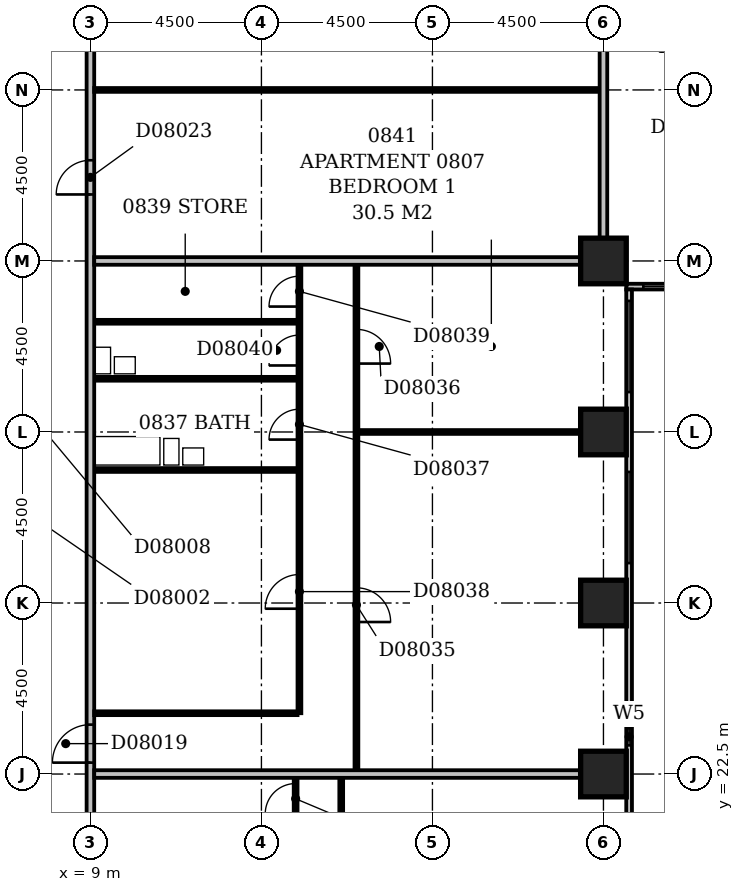
"""IFC4 building model, lengths in metres.
Left out: names, types, materials, properties, quantities, classifications, styles, units other than length and angle.
Written with IfcOpenShell. Run it as: python <this file> out.ifc"""

import sys

from ifc_helpers import new_model, si_unit, direction, frame, frame_2d, origin, origin_2d, place, context, subcontext, project, spatial, rectangle, extrude, element, fill, save


model = new_model("IFC4")
c1 = context("Model", 3, precision=1e-05, world=origin(), true_north=direction((0.0, 1.0)))
c2 = subcontext(c1, "Body", "Model", "MODEL_VIEW")
j1 = project(units=[si_unit("LENGTHUNIT", "METRE"), si_unit("PLANEANGLEUNIT", "RADIAN")], contexts=[c1])
p1 = place(None, origin())
s1 = spatial("IfcSite", under=j1, at=p1, CompositionType="ELEMENT")
p2 = place(p1, origin())
s2 = spatial("IfcBuilding", under=s1, at=p2, CompositionType="ELEMENT")
p3 = place(p2, frame((0.0, 0.0, 39.8)))
s3 = spatial("IfcBuildingStorey", under=s2, at=p3, CompositionType="ELEMENT", Elevation=39.8)
for number, where, z_axis, x_axis in (
    (1, (22.5, 22.5, -0.3), (0.0, 0.0, 1.0), (1.0, 0.0, 0.0)),
    (2, (22.5, 27.0, -0.3), (0.0, 0.0, 1.0), (1.0, 0.0, 0.0)),
    (3, (22.5, 31.5, -0.3), (0.0, 0.0, 1.0), (1.0, 0.0, 0.0)),
    (4, (22.5, 36.0, -0.3), (0.0, 0.0, 1.0), (1.0, 0.0, 0.0)),
):
    element("IfcColumn", number, at=place(p3, frame(where, z_axis=z_axis, x_axis=x_axis)), inside=s3, PredefinedType="COLUMN", context=c2, shape_type="SweptSolid", body=[
        extrude(rectangle(XDim=1.2, YDim=1.2, at=origin_2d()), origin(), (0.0, 0.0, 1.0), 3.6),
    ])
p4 = place(p3, frame((23.175, 17.4, 0.0), z_axis=(0.0, 0.0, 1.0), x_axis=(0.0, 1.0, 0.0)))
e5 = element("IfcWall", 5, at=p4, inside=s3, PredefinedType="STANDARD", context=c2, shape_type="SweptSolid", body=[
    extrude(rectangle(XDim=17.85, YDim=0.15, at=frame_2d((8.925, 0.0))), origin(), (0.0, 0.0, 1.0), 2.7),
])
p5 = place(p4, frame((1.65, 0.0, 0.6)))
e6 = element("IfcOpeningElement", 6, at=p5, cuts=e5, PredefinedType="OPENING", context=c2, shape_type="SweptSolid", body=[
    extrude(rectangle(XDim=2.4, YDim=1.8, at=frame_2d((1.2, 0.9))), frame((0.0, 0.087, 0.0), z_axis=(0.0, -1.0, 0.0), x_axis=(1.0, 0.0, 0.0)), (0.0, 0.0, 1.0), 0.174),
])
p6 = place(p4, frame((5.854, 0.0, 0.6)))
e7 = element("IfcOpeningElement", 7, at=p6, cuts=e5, PredefinedType="OPENING", context=c2, shape_type="SweptSolid", body=[
    extrude(rectangle(XDim=0.45, YDim=1.8, at=frame_2d((0.225, 0.9))), frame((0.0, 0.087, 0.0), z_axis=(0.0, -1.0, 0.0), x_axis=(1.0, 0.0, 0.0)), (0.0, 0.0, 1.0), 0.174),
])
p7 = place(p4, frame((10.65, 0.0, 0.6)))
e8 = element("IfcOpeningElement", 8, at=p7, cuts=e5, PredefinedType="OPENING", context=c2, shape_type="SweptSolid", body=[
    extrude(rectangle(XDim=2.4, YDim=1.8, at=frame_2d((1.2, 0.9))), frame((0.0, 0.087, 0.0), z_axis=(0.0, -1.0, 0.0), x_axis=(1.0, 0.0, 0.0)), (0.0, 0.0, 1.0), 0.174),
])
p8 = place(p4, frame((15.15, 0.0, 0.6)))
e9 = element("IfcOpeningElement", 9, at=p8, cuts=e5, PredefinedType="OPENING", context=c2, shape_type="SweptSolid", body=[
    extrude(rectangle(XDim=2.4, YDim=1.8, at=frame_2d((1.2, 0.9))), frame((0.0, 0.087, 0.0), z_axis=(0.0, -1.0, 0.0), x_axis=(1.0, 0.0, 0.0)), (0.0, 0.0, 1.0), 0.174),
])
p9 = place(p3, frame((23.1, 35.325, 0.0), z_axis=(0.0, 0.0, 1.0), x_axis=(1.0, 0.0, 0.0)))
e10 = element("IfcWall", 10, at=p9, inside=s3, PredefinedType="STANDARD", context=c2, shape_type="SweptSolid", body=[
    extrude(rectangle(XDim=45.15, YDim=0.15, at=frame_2d((22.575, 0.0))), origin(), (0.0, 0.0, 1.0), 2.7),
])
p10 = place(p9, frame((0.45, 0.0, 0.6)))
e11 = element("IfcOpeningElement", 11, at=p10, cuts=e10, PredefinedType="OPENING", context=c2, shape_type="SweptSolid", body=[
    extrude(rectangle(XDim=2.4, YDim=1.8, at=frame_2d((1.2, 0.9))), frame((0.0, 0.087, 0.0), z_axis=(0.0, -1.0, 0.0), x_axis=(1.0, 0.0, 0.0)), (0.0, 0.0, 1.0), 0.174),
])
p11 = place(p9, frame((6.56, 0.0, 0.6)))
e12 = element("IfcOpeningElement", 12, at=p11, cuts=e10, PredefinedType="OPENING", context=c2, shape_type="SweptSolid", body=[
    extrude(rectangle(XDim=0.9, YDim=1.8, at=frame_2d((0.45, 0.9))), frame((0.0, 0.087, 0.0), z_axis=(0.0, -1.0, 0.0), x_axis=(1.0, 0.0, 0.0)), (0.0, 0.0, 1.0), 0.174),
])
p12 = place(p9, frame((9.45, 0.0, 0.6)))
e13 = element("IfcOpeningElement", 13, at=p12, cuts=e10, PredefinedType="OPENING", context=c2, shape_type="SweptSolid", body=[
    extrude(rectangle(XDim=2.4, YDim=1.8, at=frame_2d((1.2, 0.9))), frame((0.0, 0.087, 0.0), z_axis=(0.0, -1.0, 0.0), x_axis=(1.0, 0.0, 0.0)), (0.0, 0.0, 1.0), 0.174),
])
p13 = place(p9, frame((13.95, 0.0, 0.6)))
e14 = element("IfcOpeningElement", 14, at=p13, cuts=e10, PredefinedType="OPENING", context=c2, shape_type="SweptSolid", body=[
    extrude(rectangle(XDim=2.4, YDim=1.8, at=frame_2d((1.2, 0.9))), frame((0.0, 0.087, 0.0), z_axis=(0.0, -1.0, 0.0), x_axis=(1.0, 0.0, 0.0)), (0.0, 0.0, 1.0), 0.174),
])
p14 = place(p9, frame((18.33, 0.0, 0.6)))
e15 = element("IfcOpeningElement", 15, at=p14, cuts=e10, PredefinedType="OPENING", context=c2, shape_type="SweptSolid", body=[
    extrude(rectangle(XDim=1.5, YDim=1.8, at=frame_2d((0.75, 0.9))), frame((0.0, 0.087, 0.0), z_axis=(0.0, -1.0, 0.0), x_axis=(1.0, 0.0, 0.0)), (0.0, 0.0, 1.0), 0.174),
])
p15 = place(p9, frame((22.95, 0.0, 0.6)))
e16 = element("IfcOpeningElement", 16, at=p15, cuts=e10, PredefinedType="OPENING", context=c2, shape_type="SweptSolid", body=[
    extrude(rectangle(XDim=2.4, YDim=1.8, at=frame_2d((1.2, 0.9))), frame((0.0, 0.087, 0.0), z_axis=(0.0, -1.0, 0.0), x_axis=(1.0, 0.0, 0.0)), (0.0, 0.0, 1.0), 0.174),
])
p16 = place(p9, frame((27.45, 0.0, 0.6)))
e17 = element("IfcOpeningElement", 17, at=p16, cuts=e10, PredefinedType="OPENING", context=c2, shape_type="SweptSolid", body=[
    extrude(rectangle(XDim=2.4, YDim=1.8, at=frame_2d((1.2, 0.9))), frame((0.0, 0.087, 0.0), z_axis=(0.0, -1.0, 0.0), x_axis=(1.0, 0.0, 0.0)), (0.0, 0.0, 1.0), 0.174),
])
p17 = place(p9, frame((31.797, 0.0, 0.6)))
e18 = element("IfcOpeningElement", 18, at=p17, cuts=e10, PredefinedType="OPENING", context=c2, shape_type="SweptSolid", body=[
    extrude(rectangle(XDim=0.6, YDim=1.8, at=frame_2d((0.3, 0.9))), frame((0.0, 0.087, 0.0), z_axis=(0.0, -1.0, 0.0), x_axis=(1.0, 0.0, 0.0)), (0.0, 0.0, 1.0), 0.174),
])
p18 = place(p9, frame((36.45, 0.0, 0.6)))
e19 = element("IfcOpeningElement", 19, at=p18, cuts=e10, PredefinedType="OPENING", context=c2, shape_type="SweptSolid", body=[
    extrude(rectangle(XDim=2.4, YDim=1.8, at=frame_2d((1.2, 0.9))), frame((0.0, 0.087, 0.0), z_axis=(0.0, -1.0, 0.0), x_axis=(1.0, 0.0, 0.0)), (0.0, 0.0, 1.0), 0.174),
])
p19 = place(p9, frame((40.95, 0.0, 0.6)))
e20 = element("IfcOpeningElement", 20, at=p19, cuts=e10, PredefinedType="OPENING", context=c2, shape_type="SweptSolid", body=[
    extrude(rectangle(XDim=2.4, YDim=1.8, at=frame_2d((1.2, 0.9))), frame((0.0, 0.087, 0.0), z_axis=(0.0, -1.0, 0.0), x_axis=(1.0, 0.0, 0.0)), (0.0, 0.0, 1.0), 0.174),
])
p20 = place(p3, frame((9.0, 5.0, 0.0), z_axis=(0.0, 0.0, 1.0), x_axis=(0.0, 1.0, 0.0)))
e21 = element("IfcWall", 21, at=p20, inside=s3, PredefinedType="PARTITIONING", context=c2, shape_type="SweptSolid", body=[
    extrude(rectangle(XDim=44.5, YDim=0.2, at=frame_2d((22.25, 0.0))), origin(), (0.0, 0.0, 1.0), 3.3),
])
p21 = place(p20, frame((17.8, 0.0, 0.0)))
e22 = element("IfcOpeningElement", 22, at=p21, cuts=e21, PredefinedType="OPENING", context=c2, shape_type="SweptSolid", body=[
    extrude(rectangle(XDim=1.0, YDim=2.1, at=frame_2d((0.5, 1.05))), frame((0.0, 0.112, 0.0), z_axis=(0.0, -1.0, 0.0), x_axis=(1.0, 0.0, 0.0)), (0.0, 0.0, 1.0), 0.224),
])
p22 = place(p20, frame((14.95, 0.0, 0.0)))
e23 = element("IfcOpeningElement", 23, at=p22, cuts=e21, PredefinedType="OPENING", context=c2, shape_type="SweptSolid", body=[
    extrude(rectangle(XDim=1.0, YDim=2.1, at=frame_2d((0.5, 1.05))), frame((0.0, 0.112, 0.0), z_axis=(0.0, -1.0, 0.0), x_axis=(1.0, 0.0, 0.0)), (0.0, 0.0, 1.0), 0.224),
])
p23 = place(p20, frame((10.45, 0.0, 0.0)))
e24 = element("IfcOpeningElement", 24, at=p23, cuts=e21, PredefinedType="OPENING", context=c2, shape_type="SweptSolid", body=[
    extrude(rectangle(XDim=1.0, YDim=2.1, at=frame_2d((0.5, 1.05))), frame((0.0, 0.112, 0.0), z_axis=(0.0, -1.0, 0.0), x_axis=(1.0, 0.0, 0.0)), (0.0, 0.0, 1.0), 0.224),
])
p24 = place(p20, frame((5.95, 0.0, 0.0)))
e25 = element("IfcOpeningElement", 25, at=p24, cuts=e21, PredefinedType="OPENING", context=c2, shape_type="SweptSolid", body=[
    extrude(rectangle(XDim=1.0, YDim=2.1, at=frame_2d((0.5, 1.05))), frame((0.0, 0.112, 0.0), z_axis=(0.0, -1.0, 0.0), x_axis=(1.0, 0.0, 0.0)), (0.0, 0.0, 1.0), 0.224),
])
p25 = place(p20, frame((32.75, 0.0, 0.0)))
e26 = element("IfcOpeningElement", 26, at=p25, cuts=e21, PredefinedType="OPENING", context=c2, shape_type="SweptSolid", body=[
    extrude(rectangle(XDim=0.9, YDim=2.1, at=frame_2d((0.45, 1.05))), frame((0.0, 0.112, 0.0), z_axis=(0.0, -1.0, 0.0), x_axis=(1.0, 0.0, 0.0)), (0.0, 0.0, 1.0), 0.224),
])
p26 = place(p20, frame((1.5, 0.0, 0.0)))
e27 = element("IfcOpeningElement", 27, at=p26, cuts=e21, PredefinedType="OPENING", context=c2, shape_type="SweptSolid", body=[
    extrude(rectangle(XDim=0.9, YDim=2.1, at=frame_2d((0.45, 1.05))), frame((0.0, 0.112, 0.0), z_axis=(0.0, -1.0, 0.0), x_axis=(1.0, 0.0, 0.0)), (0.0, 0.0, 1.0), 0.224),
])
p27 = place(p3, frame((15.6, 18.1, 0.0), z_axis=(0.0, 0.0, 1.0), x_axis=(0.0, 1.0, 0.0)))
e28 = element("IfcWall", 28, at=p27, inside=s3, PredefinedType="PARTITIONING", context=c2, shape_type="SweptSolid", body=[
    extrude(rectangle(XDim=4.3, YDim=0.1, at=frame_2d((2.15, 0.0))), origin(), (0.0, 0.0, 1.0), 3.3),
])
p28 = place(p27, frame((1.7, 0.0, 0.0)))
e29 = element("IfcOpeningElement", 29, at=p28, cuts=e28, PredefinedType="OPENING", context=c2, shape_type="SweptSolid", body=[
    extrude(rectangle(XDim=0.9, YDim=2.1, at=frame_2d((0.45, 1.05))), frame((0.0, 0.062, 0.0), z_axis=(0.0, -1.0, 0.0), x_axis=(1.0, 0.0, 0.0)), (0.0, 0.0, 1.0), 0.124),
])
p29 = place(p3, frame((14.4, 21.2, 0.0), z_axis=(0.0, 0.0, 1.0), x_axis=(0.0, 1.0, 0.0)))
e30 = element("IfcWall", 30, at=p29, inside=s3, PredefinedType="PARTITIONING", context=c2, shape_type="SweptSolid", body=[
    extrude(rectangle(XDim=1.2, YDim=0.1, at=frame_2d((0.6, 0.0))), origin(), (0.0, 0.0, 1.0), 3.3),
])
p30 = place(p29, frame((0.25, 0.0, 0.0)))
e31 = element("IfcOpeningElement", 31, at=p30, cuts=e30, PredefinedType="OPENING", context=c2, shape_type="SweptSolid", body=[
    extrude(rectangle(XDim=0.8, YDim=2.1, at=frame_2d((0.4, 1.05))), frame((0.0, 0.062, 0.0), z_axis=(0.0, -1.0, 0.0), x_axis=(1.0, 0.0, 0.0)), (0.0, 0.0, 1.0), 0.124),
])
p31 = place(p3, frame((9.1, 22.5, 0.0), z_axis=(0.0, 0.0, 1.0), x_axis=(1.0, 0.0, 0.0)))
e32 = element("IfcWall", 32, at=p31, inside=s3, PredefinedType="PARTITIONING", context=c2, shape_type="SweptSolid", body=[
    extrude(rectangle(XDim=12.8, YDim=0.2, at=frame_2d((6.4, 0.0))), origin(), (0.0, 0.0, 1.0), 3.3),
])
p32 = place(p3, frame((16.0, 22.6, 0.0), z_axis=(0.0, 0.0, 1.0), x_axis=(0.0, 1.0, 0.0)))
e33 = element("IfcWall", 33, at=p32, inside=s3, PredefinedType="PARTITIONING", context=c2, shape_type="SweptSolid", body=[
    extrude(rectangle(XDim=13.3, YDim=0.1, at=frame_2d((6.65, 0.0))), origin(), (0.0, 0.0, 1.0), 3.3),
])
p33 = place(p32, frame((3.9, 0.0, 0.0)))
e34 = element("IfcOpeningElement", 34, at=p33, cuts=e33, PredefinedType="OPENING", context=c2, shape_type="SweptSolid", body=[
    extrude(rectangle(XDim=0.9, YDim=2.1, at=frame_2d((0.45, 1.05))), frame((0.0, 0.062, 0.0), z_axis=(0.0, -1.0, 0.0), x_axis=(1.0, 0.0, 0.0)), (0.0, 0.0, 1.0), 0.124),
])
p34 = place(p32, frame((10.7, 0.0, 0.0)))
e35 = element("IfcOpeningElement", 35, at=p34, cuts=e33, PredefinedType="OPENING", context=c2, shape_type="SweptSolid", body=[
    extrude(rectangle(XDim=0.9, YDim=2.1, at=frame_2d((0.45, 1.05))), frame((0.0, 0.062, 0.0), z_axis=(0.0, -1.0, 0.0), x_axis=(1.0, 0.0, 0.0)), (0.0, 0.0, 1.0), 0.124),
])
p35 = place(p3, frame((9.1, 24.1, 0.0), z_axis=(0.0, 0.0, 1.0), x_axis=(1.0, 0.0, 0.0)))
e36 = element("IfcWall", 36, at=p35, inside=s3, PredefinedType="PARTITIONING", context=c2, shape_type="SweptSolid", body=[
    extrude(rectangle(XDim=5.35, YDim=0.1, at=frame_2d((2.675, 0.0))), origin(), (0.0, 0.0, 1.0), 3.3),
])
p36 = place(p3, frame((14.5, 24.1, 0.0), z_axis=(0.0, 0.0, 1.0), x_axis=(0.0, 1.0, 0.0)))
e37 = element("IfcWall", 37, at=p36, inside=s3, PredefinedType="PARTITIONING", context=c2, shape_type="SweptSolid", body=[
    extrude(rectangle(XDim=11.8, YDim=0.1, at=frame_2d((5.9, 0.0))), origin(), (0.0, 0.0, 1.0), 3.3),
])
p37 = place(p36, frame((7.2, 0.0, 0.0)))
e38 = element("IfcOpeningElement", 38, at=p37, cuts=e37, PredefinedType="OPENING", context=c2, shape_type="SweptSolid", body=[
    extrude(rectangle(XDim=0.8, YDim=2.1, at=frame_2d((0.4, 1.05))), frame((0.0, 0.062, 0.0), z_axis=(0.0, -1.0, 0.0), x_axis=(1.0, 0.0, 0.0)), (0.0, 0.0, 1.0), 0.124),
])
p38 = place(p36, frame((2.75, 0.0, 0.0)))
e39 = element("IfcOpeningElement", 39, at=p38, cuts=e37, PredefinedType="OPENING", context=c2, shape_type="SweptSolid", body=[
    extrude(rectangle(XDim=0.9, YDim=2.1, at=frame_2d((0.45, 1.05))), frame((0.0, 0.062, 0.0), z_axis=(0.0, -1.0, 0.0), x_axis=(1.0, 0.0, 0.0)), (0.0, 0.0, 1.0), 0.124),
])
p39 = place(p36, frame((10.7, 0.0, 0.0)))
e40 = element("IfcOpeningElement", 40, at=p39, cuts=e37, PredefinedType="OPENING", context=c2, shape_type="SweptSolid", body=[
    extrude(rectangle(XDim=0.8, YDim=2.1, at=frame_2d((0.4, 1.05))), frame((0.0, 0.062, 0.0), z_axis=(0.0, -1.0, 0.0), x_axis=(1.0, 0.0, 0.0)), (0.0, 0.0, 1.0), 0.124),
])
p40 = place(p36, frame((9.15, 0.0, 0.0)))
e41 = element("IfcOpeningElement", 41, at=p40, cuts=e37, PredefinedType="OPENING", context=c2, shape_type="SweptSolid", body=[
    extrude(rectangle(XDim=0.8, YDim=2.1, at=frame_2d((0.4, 1.05))), frame((0.0, 0.062, 0.0), z_axis=(0.0, -1.0, 0.0), x_axis=(1.0, 0.0, 0.0)), (0.0, 0.0, 1.0), 0.124),
])
p41 = place(p3, frame((9.1, 30.5, 0.0), z_axis=(0.0, 0.0, 1.0), x_axis=(1.0, 0.0, 0.0)))
e42 = element("IfcWall", 42, at=p41, inside=s3, PredefinedType="PLUMBINGWALL", context=c2, shape_type="SweptSolid", body=[
    extrude(rectangle(XDim=5.35, YDim=0.1, at=frame_2d((2.675, 0.0))), origin(), (0.0, 0.0, 1.0), 3.3),
])
p42 = place(p3, frame((16.05, 31.5, 0.0), z_axis=(0.0, 0.0, 1.0), x_axis=(1.0, 0.0, 0.0)))
e43 = element("IfcWall", 43, at=p42, inside=s3, PredefinedType="PARTITIONING", context=c2, shape_type="SweptSolid", body=[
    extrude(rectangle(XDim=5.85, YDim=0.1, at=frame_2d((2.925, 0.0))), origin(), (0.0, 0.0, 1.0), 3.3),
])
for number, where, z_axis, x_axis in (
    (44, (9.1, 32.9, 0.0), (0.0, 0.0, 1.0), (1.0, 0.0, 0.0)),
    (45, (9.1, 34.4, 0.0), (0.0, 0.0, 1.0), (1.0, 0.0, 0.0)),
):
    element("IfcWall", number, at=place(p3, frame(where, z_axis=z_axis, x_axis=x_axis)), inside=s3, PredefinedType="PLUMBINGWALL", context=c2, shape_type="SweptSolid", body=[
        extrude(rectangle(XDim=5.35, YDim=0.1, at=frame_2d((2.675, 0.0))), origin(), (0.0, 0.0, 1.0), 3.3),
    ])
p43 = place(p3, frame((9.1, 36.0, 0.0), z_axis=(0.0, 0.0, 1.0), x_axis=(1.0, 0.0, 0.0)))
e46 = element("IfcWall", 46, at=p43, inside=s3, PredefinedType="PARTITIONING", context=c2, shape_type="SweptSolid", body=[
    extrude(rectangle(XDim=12.8, YDim=0.2, at=frame_2d((6.4, 0.0))), origin(), (0.0, 0.0, 1.0), 2.4),
])
p44 = place(p3, frame((22.5, 36.6, 0.0), z_axis=(0.0, 0.0, 1.0), x_axis=(0.0, 1.0, 0.0)))
e47 = element("IfcWall", 47, at=p44, inside=s3, PredefinedType="PARTITIONING", context=c2, shape_type="SweptSolid", body=[
    extrude(rectangle(XDim=12.8, YDim=0.2, at=frame_2d((6.4, 0.0))), origin(), (0.0, 0.0, 1.0), 3.3),
])
p45 = place(p3, frame((9.1, 40.5, 0.0), z_axis=(0.0, 0.0, 1.0), x_axis=(1.0, 0.0, 0.0)))
e48 = element("IfcWall", 48, at=p45, inside=s3, PredefinedType="PARTITIONING", context=c2, shape_type="SweptSolid", body=[
    extrude(rectangle(XDim=13.3, YDim=0.1, at=frame_2d((6.65, 0.0))), origin(), (0.0, 0.0, 1.0), 3.3),
])
p46 = place(p6, origin())
e49 = element("IfcWindow", 49, at=p46, inside=s3, PartitioningType="SINGLE_PANEL", PredefinedType="WINDOW", context=c2, shape_type="SweptSolid", body=[
    extrude(rectangle(XDim=0.45, YDim=1.8, at=frame_2d((0.225, 0.9))), frame((0.0, 0.03, 0.0), z_axis=(0.0, -1.0, 0.0), x_axis=(1.0, 0.0, 0.0)), (0.0, 0.0, 1.0), 0.06),
])
fill(e7, e49)
p47 = place(p7, origin())
e50 = element("IfcWindow", 50, at=p47, inside=s3, PartitioningType="SINGLE_PANEL", PredefinedType="WINDOW", context=c2, shape_type="SweptSolid", body=[
    extrude(rectangle(XDim=2.4, YDim=1.8, at=frame_2d((1.2, 0.9))), frame((0.0, 0.03, 0.0), z_axis=(0.0, -1.0, 0.0), x_axis=(1.0, 0.0, 0.0)), (0.0, 0.0, 1.0), 0.06),
])
fill(e8, e50)
p48 = place(p8, origin())
e51 = element("IfcWindow", 51, at=p48, inside=s3, PartitioningType="SINGLE_PANEL", PredefinedType="WINDOW", context=c2, shape_type="SweptSolid", body=[
    extrude(rectangle(XDim=2.4, YDim=1.8, at=frame_2d((1.2, 0.9))), frame((0.0, 0.03, 0.0), z_axis=(0.0, -1.0, 0.0), x_axis=(1.0, 0.0, 0.0)), (0.0, 0.0, 1.0), 0.06),
])
fill(e9, e51)
p49 = place(p10, origin())
e52 = element("IfcWindow", 52, at=p49, inside=s3, PartitioningType="SINGLE_PANEL", PredefinedType="WINDOW", context=c2, shape_type="SweptSolid", body=[
    extrude(rectangle(XDim=2.4, YDim=1.8, at=frame_2d((1.2, 0.9))), frame((0.0, 0.03, 0.0), z_axis=(0.0, -1.0, 0.0), x_axis=(1.0, 0.0, 0.0)), (0.0, 0.0, 1.0), 0.06),
])
fill(e11, e52)
p50 = place(p21, origin())
e53 = element("IfcDoor", 53, at=p50, inside=s3, OperationType="SINGLE_SWING_LEFT", PredefinedType="DOOR", context=c2, shape_type="SweptSolid", body=[
    extrude(rectangle(XDim=1.0, YDim=2.1, at=frame_2d((0.5, 1.05))), frame((0.0, 0.025, 0.0), z_axis=(0.0, -1.0, 0.0), x_axis=(1.0, 0.0, 0.0)), (0.0, 0.0, 1.0), 0.05),
])
fill(e22, e53)
p51 = place(p25, origin())
e54 = element("IfcDoor", 54, at=p51, inside=s3, OperationType="SINGLE_SWING_LEFT", PredefinedType="DOOR", context=c2, shape_type="SweptSolid", body=[
    extrude(rectangle(XDim=0.9, YDim=2.1, at=frame_2d((0.45, 1.05))), frame((0.0, 0.025, 0.0), z_axis=(0.0, -1.0, 0.0), x_axis=(1.0, 0.0, 0.0)), (0.0, 0.0, 1.0), 0.05),
])
fill(e26, e54)
p52 = place(p30, origin())
e55 = element("IfcDoor", 55, at=p52, inside=s3, OperationType="SINGLE_SWING_LEFT", PredefinedType="DOOR", context=c2, shape_type="SweptSolid", body=[
    extrude(rectangle(XDim=0.8, YDim=2.1, at=frame_2d((0.4, 1.05))), frame((0.0, 0.025, 0.0), z_axis=(0.0, -1.0, 0.0), x_axis=(1.0, 0.0, 0.0)), (0.0, 0.0, 1.0), 0.05),
])
fill(e31, e55)
p53 = place(p33, frame((0.9, 0.0, 0.0), z_axis=(0.0, 0.0, 1.0), x_axis=(-1.0, 0.0, 0.0)))
e56 = element("IfcDoor", 56, at=p53, inside=s3, OperationType="SINGLE_SWING_RIGHT", PredefinedType="DOOR", context=c2, shape_type="SweptSolid", body=[
    extrude(rectangle(XDim=0.9, YDim=2.1, at=frame_2d((0.45, 1.05))), frame((0.0, 0.025, 0.0), z_axis=(0.0, -1.0, 0.0), x_axis=(1.0, 0.0, 0.0)), (0.0, 0.0, 1.0), 0.05),
])
fill(e34, e56)
p54 = place(p34, frame((0.9, 0.0, 0.0), z_axis=(0.0, 0.0, 1.0), x_axis=(-1.0, 0.0, 0.0)))
e57 = element("IfcDoor", 57, at=p54, inside=s3, OperationType="SINGLE_SWING_RIGHT", PredefinedType="DOOR", context=c2, shape_type="SweptSolid", body=[
    extrude(rectangle(XDim=0.9, YDim=2.1, at=frame_2d((0.45, 1.05))), frame((0.0, 0.025, 0.0), z_axis=(0.0, -1.0, 0.0), x_axis=(1.0, 0.0, 0.0)), (0.0, 0.0, 1.0), 0.05),
])
fill(e35, e57)
p55 = place(p37, origin())
e58 = element("IfcDoor", 58, at=p55, inside=s3, OperationType="SINGLE_SWING_LEFT", PredefinedType="DOOR", context=c2, shape_type="SweptSolid", body=[
    extrude(rectangle(XDim=0.8, YDim=2.1, at=frame_2d((0.4, 1.05))), frame((0.0, 0.025, 0.0), z_axis=(0.0, -1.0, 0.0), x_axis=(1.0, 0.0, 0.0)), (0.0, 0.0, 1.0), 0.05),
])
fill(e38, e58)
p56 = place(p38, origin())
e59 = element("IfcDoor", 59, at=p56, inside=s3, OperationType="SINGLE_SWING_LEFT", PredefinedType="DOOR", context=c2, shape_type="SweptSolid", body=[
    extrude(rectangle(XDim=0.9, YDim=2.1, at=frame_2d((0.45, 1.05))), frame((0.0, 0.025, 0.0), z_axis=(0.0, -1.0, 0.0), x_axis=(1.0, 0.0, 0.0)), (0.0, 0.0, 1.0), 0.05),
])
fill(e39, e59)
p57 = place(p39, origin())
e60 = element("IfcDoor", 60, at=p57, inside=s3, OperationType="SINGLE_SWING_LEFT", PredefinedType="DOOR", context=c2, shape_type="SweptSolid", body=[
    extrude(rectangle(XDim=0.8, YDim=2.1, at=frame_2d((0.4, 1.05))), frame((0.0, 0.025, 0.0), z_axis=(0.0, -1.0, 0.0), x_axis=(1.0, 0.0, 0.0)), (0.0, 0.0, 1.0), 0.05),
])
fill(e40, e60)
p58 = place(p40, origin())
e61 = element("IfcDoor", 61, at=p58, inside=s3, OperationType="SINGLE_SWING_LEFT", PredefinedType="DOOR", context=c2, shape_type="SweptSolid", body=[
    extrude(rectangle(XDim=0.8, YDim=2.1, at=frame_2d((0.4, 1.05))), frame((0.0, 0.025, 0.0), z_axis=(0.0, -1.0, 0.0), x_axis=(1.0, 0.0, 0.0)), (0.0, 0.0, 1.0), 0.05),
])
fill(e41, e61)
save(model, sys.argv[1])
